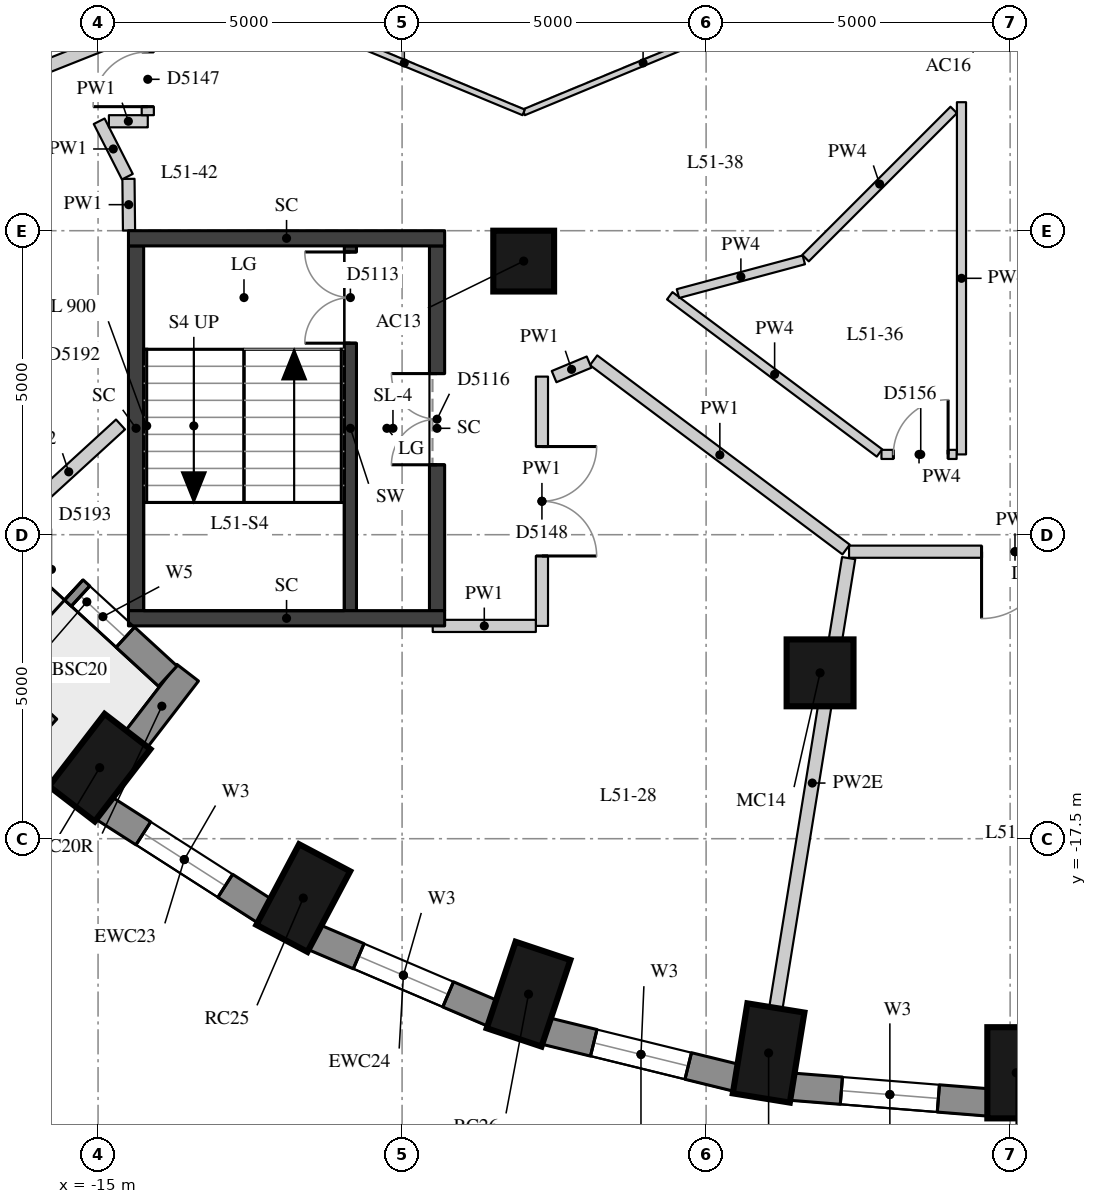
"""IFC4 building model, lengths in metres.
Left out: names, types, materials, properties, quantities, classifications, styles, units other than length and angle.
Written with IfcOpenShell. Run it as: python <this file> out.ifc"""

import sys

from ifc_helpers import new_model, si_unit, direction, frame, frame_2d, origin, origin_2d, place, context, subcontext, project, spatial, rectangle, extrude, element, fill, save


model = new_model("IFC4")
c1 = context("Model", 3, precision=1e-05, world=origin(), true_north=direction((0.0, 1.0)))
c2 = subcontext(c1, "Body", "Model", "MODEL_VIEW")
j1 = project(units=[si_unit("LENGTHUNIT", "METRE"), si_unit("PLANEANGLEUNIT", "RADIAN")], contexts=[c1])
p1 = place(None, origin())
s1 = spatial("IfcSite", under=j1, at=p1, CompositionType="ELEMENT")
p2 = place(p1, origin())
s2 = spatial("IfcBuilding", under=s1, at=p2, CompositionType="ELEMENT")
p3 = place(p2, frame((0.0, 0.0, 181.4)))
s3 = spatial("IfcBuildingStorey", under=s2, at=p3, CompositionType="ELEMENT", Elevation=181.4)
for number, where, z_axis, x_axis in (
    (1, (-14.973, -16.332, 0.0), (0.0, 0.0, 1.0), (-0.61, -0.792, 0.0)),
    (2, (-11.625, -18.476, 0.0), (0.0, 0.0, 1.0), (-0.468, -0.884, 0.0)),
    (3, (-7.92, -20.056, 0.0), (0.0, 0.0, 1.0), (-0.317, -0.949, 0.0)),
    (4, (-3.972, -21.024, 0.0), (0.0, 0.0, 1.0), (-0.16, -0.987, 0.0)),
    (5, (0.1, -21.35, 0.0), (0.0, 0.0, 1.0), (0.0, -1.0, 0.0)),
):
    element("IfcColumn", number, at=place(p3, frame(where, z_axis=z_axis, x_axis=x_axis)), inside=s3, PredefinedType="COLUMN", context=c2, shape_type="SweptSolid", body=[
        extrude(rectangle(XDim=1.5, YDim=0.95, at=origin_2d()), origin(), (0.0, 0.0, 1.0), 3.3),
    ])
p4 = place(p3, frame((-8.0, -8.0, 0.0), z_axis=(0.0, 0.0, 1.0), x_axis=(1.0, 0.0, 0.0)))
e6 = element("IfcColumn", 6, at=p4, inside=s3, PredefinedType="COLUMN", context=c2, shape_type="SweptSolid", body=[
    extrude(rectangle(XDim=1.0, YDim=1.0, at=origin_2d()), origin(), (0.0, 0.0, 1.0), 3.3),
])
p5 = place(p3, frame((-3.126, -14.772, 0.0), z_axis=(0.0, 0.0, 1.0), x_axis=(1.0, 0.0, 0.0)))
e7 = element("IfcColumn", 7, at=p5, inside=s3, PredefinedType="COLUMN", context=c2, shape_type="SweptSolid", body=[
    extrude(rectangle(XDim=1.1, YDim=1.1, at=origin_2d()), origin(), (0.0, 0.0, 1.0), 3.3),
])
p6 = place(p3, frame((-14.908, -16.993, 0.0), z_axis=(0.0, 0.0, 1.0), x_axis=(0.842065914439, -0.539374633943, 0.0)))
e8 = element("IfcWall", 8, at=p6, inside=s3, PredefinedType="SOLIDWALL", context=c2, shape_type="SweptSolid", body=[
    extrude(rectangle(XDim=3.151, YDim=0.45, at=frame_2d((1.576, 0.0))), origin(), (0.0, 0.0, 1.0), 2.85),
])
p7 = place(p6, frame((0.776, 0.0, 0.4)))
e9 = element("IfcOpeningElement", 9, at=p7, cuts=e8, PredefinedType="OPENING", context=c2, shape_type="SweptSolid", body=[
    extrude(rectangle(XDim=1.6, YDim=1.75, at=frame_2d((0.8, 0.875))), frame((0.0, 0.235, 0.0), z_axis=(0.0, -1.0, 0.0), x_axis=(1.0, 0.0, 0.0)), (0.0, 0.0, 1.0), 0.47),
])
p8 = place(p3, frame((-11.45, -19.119, 0.0), z_axis=(0.0, 0.0, 1.0), x_axis=(0.919798725687, -0.392390499663, 0.0)))
e10 = element("IfcWall", 10, at=p8, inside=s3, PredefinedType="SOLIDWALL", context=c2, shape_type="SweptSolid", body=[
    extrude(rectangle(XDim=3.2, YDim=0.45, at=frame_2d((1.6, 0.0))), origin(), (0.0, 0.0, 1.0), 2.85),
])
p9 = place(p8, frame((0.8, 0.0, 0.4)))
e11 = element("IfcOpeningElement", 11, at=p9, cuts=e10, PredefinedType="OPENING", context=c2, shape_type="SweptSolid", body=[
    extrude(rectangle(XDim=1.6, YDim=1.75, at=frame_2d((0.8, 0.875))), frame((0.0, 0.235, 0.0), z_axis=(0.0, -1.0, 0.0), x_axis=(1.0, 0.0, 0.0)), (0.0, 0.0, 1.0), 0.47),
])
p10 = place(p3, frame((-7.643, -20.662, 0.0), z_axis=(0.0, 0.0, 1.0), x_axis=(0.971232901476, -0.238131583563, 0.0)))
e12 = element("IfcWall", 12, at=p10, inside=s3, PredefinedType="SOLIDWALL", context=c2, shape_type="SweptSolid", body=[
    extrude(rectangle(XDim=3.237, YDim=0.45, at=frame_2d((1.618, 0.0))), origin(), (0.0, 0.0, 1.0), 2.85),
])
p11 = place(p10, frame((0.818, 0.0, 0.4)))
e13 = element("IfcOpeningElement", 13, at=p11, cuts=e12, PredefinedType="OPENING", context=c2, shape_type="SweptSolid", body=[
    extrude(rectangle(XDim=1.6, YDim=1.75, at=frame_2d((0.8, 0.875))), frame((0.0, 0.235, 0.0), z_axis=(0.0, -1.0, 0.0), x_axis=(1.0, 0.0, 0.0)), (0.0, 0.0, 1.0), 0.47),
])
p12 = place(p3, frame((-3.601, -21.578, 0.0), z_axis=(0.0, 0.0, 1.0), x_axis=(0.996812416891, -0.079780984773, 0.0)))
e14 = element("IfcWall", 14, at=p12, inside=s3, PredefinedType="SOLIDWALL", context=c2, shape_type="SweptSolid", body=[
    extrude(rectangle(XDim=3.256, YDim=0.45, at=frame_2d((1.628, 0.0))), origin(), (0.0, 0.0, 1.0), 2.85),
])
p13 = place(p12, frame((0.828, 0.0, 0.4)))
e15 = element("IfcOpeningElement", 15, at=p13, cuts=e14, PredefinedType="OPENING", context=c2, shape_type="SweptSolid", body=[
    extrude(rectangle(XDim=1.6, YDim=1.75, at=frame_2d((0.8, 0.875))), frame((0.0, 0.235, 0.0), z_axis=(0.0, -1.0, 0.0), x_axis=(1.0, 0.0, 0.0)), (0.0, 0.0, 1.0), 0.47),
])
p14 = place(p3, frame((-14.375, -15.871, 0.0), z_axis=(0.0, 0.0, 1.0), x_axis=(0.609982261713, 0.792415068253, 0.0)))
e16 = element("IfcWall", 16, at=p14, inside=s3, PredefinedType="SOLIDWALL", context=c2, shape_type="SweptSolid", body=[
    extrude(rectangle(XDim=1.39, YDim=0.45, at=frame_2d((0.695, 0.0))), origin(), (0.0, 0.0, 1.0), 2.4),
])
p15 = place(p3, frame((-16.515, -12.384, 0.0), z_axis=(0.0, 0.0, 1.0), x_axis=(0.736968915604, -0.675926636133, 0.0)))
e17 = element("IfcWall", 17, at=p15, inside=s3, PredefinedType="SOLIDWALL", context=c2, shape_type="SweptSolid", body=[
    extrude(rectangle(XDim=3.612, YDim=0.45, at=frame_2d((1.806, 0.0))), origin(), (0.0, 0.0, 1.0), 2.85),
])
p16 = place(p15, frame((1.665, 0.0, 0.4)))
e18 = element("IfcOpeningElement", 18, at=p16, cuts=e17, PredefinedType="OPENING", context=c2, shape_type="SweptSolid", body=[
    extrude(rectangle(XDim=1.0, YDim=1.75, at=frame_2d((0.5, 0.875))), frame((0.0, 0.235, 0.0), z_axis=(0.0, -1.0, 0.0), x_axis=(1.0, 0.0, 0.0)), (0.0, 0.0, 1.0), 0.47),
])
p17 = place(p15, frame((0.515, 0.0, 0.0)))
e19 = element("IfcOpeningElement", 19, at=p17, cuts=e17, PredefinedType="OPENING", context=c2, shape_type="SweptSolid", body=[
    extrude(rectangle(XDim=1.0, YDim=2.15, at=frame_2d((0.5, 1.075))), frame((0.0, 0.235, 0.0), z_axis=(0.0, -1.0, 0.0), x_axis=(1.0, 0.0, 0.0)), (0.0, 0.0, 1.0), 0.47),
])
p18 = place(p3, frame((-17.244, -14.576, 0.0), z_axis=(0.0, 0.0, 1.0), x_axis=(0.737874397391, -0.674938051731, 0.0)))
e20 = element("IfcWall", 20, at=p18, inside=s3, PredefinedType="USERDEFINED", context=c2, shape_type="SweptSolid", body=[
    extrude(rectangle(XDim=1.8, YDim=0.7, at=frame_2d((0.9, 0.0))), origin(), (0.0, 0.0, 1.0), 0.75),
])
p19 = place(p3, frame((-10.85, -13.75, 0.0), z_axis=(0.0, 0.0, 1.0), x_axis=(0.0, 1.0, 0.0)))
e21 = element("IfcWall", 21, at=p19, inside=s3, PredefinedType="SHEAR", context=c2, shape_type="SweptSolid", body=[
    extrude(rectangle(XDim=6.0, YDim=0.2, at=frame_2d((3.0, 0.0))), origin(), (0.0, 0.0, 1.0), 2.85),
])
p20 = place(p19, frame((4.4, 0.0, 0.0)))
e22 = element("IfcOpeningElement", 22, at=p20, cuts=e21, PredefinedType="OPENING", context=c2, shape_type="SweptSolid", body=[
    extrude(rectangle(XDim=1.5, YDim=2.1, at=frame_2d((0.75, 1.05))), frame((0.0, 0.11, 0.0), z_axis=(0.0, -1.0, 0.0), x_axis=(1.0, 0.0, 0.0)), (0.0, 0.0, 1.0), 0.22),
])
p21 = place(p3, frame((-14.375, -13.75, -0.28), z_axis=(0.0, 0.0, 1.0), x_axis=(0.0, 1.0, 0.0)))
e23 = element("IfcWall", 23, at=p21, inside=s3, PredefinedType="SHEAR", context=c2, shape_type="SweptSolid", body=[
    extrude(rectangle(XDim=6.0, YDim=0.25, at=frame_2d((3.0, 0.0))), origin(), (0.0, 0.0, 1.0), 3.13),
])
p22 = place(p3, frame((-9.425, -13.75, -0.28), z_axis=(0.0, 0.0, 1.0), x_axis=(0.0, 1.0, 0.0)))
e24 = element("IfcWall", 24, at=p22, inside=s3, PredefinedType="SHEAR", context=c2, shape_type="SweptSolid", body=[
    extrude(rectangle(XDim=6.0, YDim=0.25, at=frame_2d((3.0, 0.0))), origin(), (0.0, 0.0, 1.0), 3.13),
])
p23 = place(p22, frame((2.4, 0.0, 0.28)))
e25 = element("IfcOpeningElement", 25, at=p23, cuts=e24, PredefinedType="OPENING", context=c2, shape_type="SweptSolid", body=[
    extrude(rectangle(XDim=1.5, YDim=2.1, at=frame_2d((0.75, 1.05))), frame((0.0, 0.135, 0.0), z_axis=(0.0, -1.0, 0.0), x_axis=(1.0, 0.0, 0.0)), (0.0, 0.0, 1.0), 0.27),
])
for number, where, z_axis, x_axis in (
    (26, (-14.5, -7.625, -0.28), (0.0, 0.0, 1.0), (1.0, 0.0, 0.0)),
    (27, (-14.5, -13.875, -0.28), (0.0, 0.0, 1.0), (1.0, 0.0, 0.0)),
):
    element("IfcWall", number, at=place(p3, frame(where, z_axis=z_axis, x_axis=x_axis)), inside=s3, PredefinedType="SHEAR", context=c2, shape_type="SweptSolid", body=[
        extrude(rectangle(XDim=5.2, YDim=0.25, at=frame_2d((2.6, 0.0))), origin(), (0.0, 0.0, 1.0), 3.13),
    ])
p24 = place(p3, frame((-7.7, -9.9, 0.0), z_axis=(0.0, 0.0, 1.0), x_axis=(0.0, -1.0, 0.0)))
e28 = element("IfcWall", 28, at=p24, inside=s3, PredefinedType="PARTITIONING", context=c2, shape_type="SweptSolid", body=[
    extrude(rectangle(XDim=4.1, YDim=0.2, at=frame_2d((2.05, 0.0))), origin(), (0.0, 0.0, 1.0), 2.85),
])
p25 = place(p24, frame((1.15, 0.0, 0.0)))
e29 = element("IfcOpeningElement", 29, at=p25, cuts=e28, PredefinedType="OPENING", context=c2, shape_type="SweptSolid", body=[
    extrude(rectangle(XDim=1.8, YDim=2.1, at=frame_2d((0.9, 1.05))), frame((0.0, 0.11, 0.0), z_axis=(0.0, -1.0, 0.0), x_axis=(1.0, 0.0, 0.0)), (0.0, 0.0, 1.0), 0.22),
])
p26 = place(p3, frame((-7.8, -14.0, 0.0), z_axis=(0.0, 0.0, 1.0), x_axis=(-1.0, 0.0, 0.0)))
e30 = element("IfcWall", 30, at=p26, inside=s3, PredefinedType="PARTITIONING", context=c2, shape_type="SweptSolid", body=[
    extrude(rectangle(XDim=1.696, YDim=0.2, at=frame_2d((0.848, 0.0))), origin(), (0.0, 0.0, 1.0), 2.85),
])
p27 = place(p3, frame((-14.491, -7.496, 0.0), z_axis=(0.0, 0.0, 1.0), x_axis=(-0.010931452674, 0.999940249886, 0.0)))
e31 = element("IfcWall", 31, at=p27, inside=s3, PredefinedType="PARTITIONING", context=c2, shape_type="SweptSolid", body=[
    extrude(rectangle(XDim=0.849, YDim=0.2, at=frame_2d((0.424, 0.0))), origin(), (0.0, 0.0, 1.0), 2.85),
])
p28 = place(p3, frame((-14.518, -6.612, 0.0), z_axis=(0.0, 0.0, 1.0), x_axis=(-0.45321774915, 0.891399838375, 0.0)))
e32 = element("IfcWall", 32, at=p28, inside=s3, PredefinedType="PARTITIONING", context=c2, shape_type="SweptSolid", body=[
    extrude(rectangle(XDim=1.023, YDim=0.2, at=frame_2d((0.511, 0.0))), origin(), (0.0, 0.0, 1.0), 2.85),
])
p29 = place(p3, frame((-14.822, -5.7, 0.0), z_axis=(0.0, 0.0, 1.0), x_axis=(1.0, 0.0, 0.0)))
e33 = element("IfcWall", 33, at=p29, inside=s3, PredefinedType="PARTITIONING", context=c2, shape_type="SweptSolid", body=[
    extrude(rectangle(XDim=0.639, YDim=0.2, at=frame_2d((0.32, 0.0))), origin(), (0.0, 0.0, 1.0), 2.85),
])
p30 = place(p3, frame((-14.182, -5.6, 0.0), z_axis=(0.0, 0.0, 1.0), x_axis=(0.0, 1.0, 0.0)))
e34 = element("IfcWall", 34, at=p30, inside=s3, PredefinedType="PARTITIONING", context=c2, shape_type="SweptSolid", body=[
    extrude(rectangle(XDim=4.111, YDim=0.2, at=frame_2d((2.055, 0.0))), origin(), (0.0, 0.0, 1.0), 2.85),
])
p31 = place(p30, frame((0.14, 0.0, 0.0)))
e35 = element("IfcOpeningElement", 35, at=p31, cuts=e34, PredefinedType="OPENING", context=c2, shape_type="SweptSolid", body=[
    extrude(rectangle(XDim=0.9, YDim=2.1, at=frame_2d((0.45, 1.05))), frame((0.0, 0.11, 0.0), z_axis=(0.0, -1.0, 0.0), x_axis=(1.0, 0.0, 0.0)), (0.0, 0.0, 1.0), 0.22),
])
p32 = place(p3, frame((2.809, -12.78, 0.0), z_axis=(0.0, 0.0, 1.0), x_axis=(-1.0, 0.0, 0.0)))
e36 = element("IfcWall", 36, at=p32, inside=s3, PredefinedType="PARTITIONING", context=c2, shape_type="SweptSolid", body=[
    extrude(rectangle(XDim=5.458, YDim=0.2, at=frame_2d((2.729, 0.0))), origin(), (0.0, 0.0, 1.0), 2.85),
])
p33 = place(p32, frame((2.179, 0.0, 0.0)))
e37 = element("IfcOpeningElement", 37, at=p33, cuts=e36, PredefinedType="OPENING", context=c2, shape_type="SweptSolid", body=[
    extrude(rectangle(XDim=1.1, YDim=2.1, at=frame_2d((0.55, 1.05))), frame((0.0, 0.11, 0.0), z_axis=(0.0, -1.0, 0.0), x_axis=(1.0, 0.0, 0.0)), (0.0, 0.0, 1.0), 0.22),
])
p34 = place(p3, frame((-2.698, -12.744, 0.0), z_axis=(0.0, 0.0, 1.0), x_axis=(-0.800208812098, 0.59972148289, 0.0)))
e38 = element("IfcWall", 38, at=p34, inside=s3, PredefinedType="PARTITIONING", context=c2, shape_type="SweptSolid", body=[
    extrude(rectangle(XDim=5.19, YDim=0.2, at=frame_2d((2.595, 0.0))), origin(), (0.0, 0.0, 1.0), 2.85),
])
p35 = place(p3, frame((-6.925, -9.661, 0.0), z_axis=(0.0, 0.0, 1.0), x_axis=(-0.923725195793, -0.383055821855, 0.0)))
e39 = element("IfcWall", 39, at=p35, inside=s3, PredefinedType="PARTITIONING", context=c2, shape_type="SweptSolid", body=[
    extrude(rectangle(XDim=0.623, YDim=0.2, at=frame_2d((0.312, 0.0))), origin(), (0.0, 0.0, 1.0), 2.85),
])
p36 = place(p3, frame((-0.8, -5.386, 0.0), z_axis=(0.0, 0.0, 1.0), x_axis=(0.0, -1.0, 0.0)))
e40 = element("IfcWall", 40, at=p36, inside=s3, PredefinedType="PARTITIONING", context=c2, shape_type="SweptSolid", body=[
    extrude(rectangle(XDim=5.793, YDim=0.15, at=frame_2d((2.896, 0.0))), origin(), (0.0, 0.0, 1.0), 2.85),
])
p37 = place(p3, frame((-0.88, -11.179, 0.0), z_axis=(0.0, 0.0, 1.0), x_axis=(-1.0, 0.0, 0.0)))
e41 = element("IfcWall", 41, at=p37, inside=s3, PredefinedType="PARTITIONING", context=c2, shape_type="SweptSolid", body=[
    extrude(rectangle(XDim=1.236, YDim=0.15, at=frame_2d((0.618, 0.0))), origin(), (0.0, 0.0, 1.0), 2.85),
])
p38 = place(p37, frame((0.14, 0.0, 0.0)))
e42 = element("IfcOpeningElement", 42, at=p38, cuts=e41, PredefinedType="OPENING", context=c2, shape_type="SweptSolid", body=[
    extrude(rectangle(XDim=0.9, YDim=2.1, at=frame_2d((0.45, 1.05))), frame((0.0, 0.085, 0.0), z_axis=(0.0, -1.0, 0.0), x_axis=(1.0, 0.0, 0.0)), (0.0, 0.0, 1.0), 0.17),
])
p39 = place(p3, frame((-2.148, -11.156, 0.0), z_axis=(0.0, 0.0, 1.0), x_axis=(-0.800210636755, 0.599719048241, 0.0)))
e43 = element("IfcWall", 43, at=p39, inside=s3, PredefinedType="PARTITIONING", context=c2, shape_type="SweptSolid", body=[
    extrude(rectangle(XDim=4.311, YDim=0.15, at=frame_2d((2.155, 0.0))), origin(), (0.0, 0.0, 1.0), 2.85),
])
p40 = place(p3, frame((-5.463, -8.534, 0.0), z_axis=(0.0, 0.0, 1.0), x_axis=(0.965888027346, 0.258960071498, 0.0)))
e44 = element("IfcWall", 44, at=p40, inside=s3, PredefinedType="PARTITIONING", context=c2, shape_type="SweptSolid", body=[
    extrude(rectangle(XDim=2.143, YDim=0.15, at=frame_2d((1.071, 0.0))), origin(), (0.0, 0.0, 1.0), 2.85),
])
p41 = place(p3, frame((-3.365, -7.951, 0.0), z_axis=(0.0, 0.0, 1.0), x_axis=(0.707106781187, 0.707106781187, 0.0)))
e45 = element("IfcWall", 45, at=p41, inside=s3, PredefinedType="PARTITIONING", context=c2, shape_type="SweptSolid", body=[
    extrude(rectangle(XDim=3.447, YDim=0.15, at=frame_2d((1.723, 0.0))), origin(), (0.0, 0.0, 1.0), 2.85),
])
p42 = place(p3, frame((-19.99, -6.441, 0.0), z_axis=(0.0, 0.0, 1.0), x_axis=(0.929499857769, 0.368822470042, 0.0)))
e46 = element("IfcWall", 46, at=p42, inside=s3, PredefinedType="PARTITIONING", context=c2, shape_type="SweptSolid", body=[
    extrude(rectangle(XDim=6.101, YDim=0.22, at=frame_2d((3.05, 0.0))), origin(), (0.0, 0.0, 1.0), 2.85),
])
p43 = place(p3, frame((-16.334, -12.245, 0.0), z_axis=(0.0, 0.0, 1.0), x_axis=(0.737917457379, 0.674890973487, 0.0)))
e47 = element("IfcWall", 47, at=p43, inside=s3, PredefinedType="PARTITIONING", context=c2, shape_type="SweptSolid", body=[
    extrude(rectangle(XDim=2.309, YDim=0.22, at=frame_2d((1.154, 0.0))), origin(), (0.0, 0.0, 1.0), 2.85),
])
p44 = place(p3, frame((-3.852, -20.284, 0.0), z_axis=(0.0, 0.0, 1.0), x_axis=(0.159690244465, 0.987167172176, 0.0)))
e48 = element("IfcWall", 48, at=p44, inside=s3, PredefinedType="PARTITIONING", context=c2, shape_type="SweptSolid", body=[
    extrude(rectangle(XDim=7.494, YDim=0.22, at=frame_2d((3.747, 0.0))), origin(), (0.0, 0.0, 1.0), 2.4),
])
for number, where, z_axis, x_axis in (
    (49, (-4.073, -3.927, 0.0), (0.0, 0.0, 1.0), (-0.924, -0.383, 0.0)),
    (50, (-8.0, -5.554, 0.0), (0.0, 0.0, 1.0), (-0.924, 0.383, 0.0)),
):
    element("IfcWall", number, at=place(p3, frame(where, z_axis=z_axis, x_axis=x_axis)), inside=s3, PredefinedType="PARTITIONING", context=c2, shape_type="SweptSolid", body=[
        extrude(rectangle(XDim=4.251, YDim=0.1, at=frame_2d((2.125, 0.0))), origin(), (0.0, 0.0, 1.0), 2.85),
    ])
p45 = place(p7, origin())
e51 = element("IfcWindow", 51, at=p45, inside=s3, PartitioningType="SINGLE_PANEL", PredefinedType="WINDOW", context=c2, shape_type="SweptSolid", body=[
    extrude(rectangle(XDim=1.6, YDim=1.75, at=frame_2d((0.8, 0.875))), frame((0.0, 0.035, 0.0), z_axis=(0.0, -1.0, 0.0), x_axis=(1.0, 0.0, 0.0)), (0.0, 0.0, 1.0), 0.06),
])
fill(e9, e51)
p46 = place(p9, origin())
e52 = element("IfcWindow", 52, at=p46, inside=s3, PartitioningType="SINGLE_PANEL", PredefinedType="WINDOW", context=c2, shape_type="SweptSolid", body=[
    extrude(rectangle(XDim=1.6, YDim=1.75, at=frame_2d((0.8, 0.875))), frame((0.0, 0.035, 0.0), z_axis=(0.0, -1.0, 0.0), x_axis=(1.0, 0.0, 0.0)), (0.0, 0.0, 1.0), 0.06),
])
fill(e11, e52)
p47 = place(p11, origin())
e53 = element("IfcWindow", 53, at=p47, inside=s3, PartitioningType="SINGLE_PANEL", PredefinedType="WINDOW", context=c2, shape_type="SweptSolid", body=[
    extrude(rectangle(XDim=1.6, YDim=1.75, at=frame_2d((0.8, 0.875))), frame((0.0, 0.035, 0.0), z_axis=(0.0, -1.0, 0.0), x_axis=(1.0, 0.0, 0.0)), (0.0, 0.0, 1.0), 0.06),
])
fill(e13, e53)
p48 = place(p13, origin())
e54 = element("IfcWindow", 54, at=p48, inside=s3, PartitioningType="SINGLE_PANEL", PredefinedType="WINDOW", context=c2, shape_type="SweptSolid", body=[
    extrude(rectangle(XDim=1.6, YDim=1.75, at=frame_2d((0.8, 0.875))), frame((0.0, 0.035, 0.0), z_axis=(0.0, -1.0, 0.0), x_axis=(1.0, 0.0, 0.0)), (0.0, 0.0, 1.0), 0.06),
])
fill(e15, e54)
p49 = place(p16, origin())
e55 = element("IfcWindow", 55, at=p49, inside=s3, PartitioningType="SINGLE_PANEL", PredefinedType="WINDOW", context=c2, shape_type="SweptSolid", body=[
    extrude(rectangle(XDim=1.0, YDim=1.75, at=frame_2d((0.5, 0.875))), frame((0.0, 0.035, 0.0), z_axis=(0.0, -1.0, 0.0), x_axis=(1.0, 0.0, 0.0)), (0.0, 0.0, 1.0), 0.06),
])
fill(e18, e55)
p50 = place(p17, origin())
e56 = element("IfcDoor", 56, at=p50, inside=s3, OperationType="SINGLE_SWING_LEFT", PredefinedType="DOOR", context=c2, shape_type="SweptSolid", body=[
    extrude(rectangle(XDim=1.0, YDim=2.15, at=frame_2d((0.5, 1.075))), frame((0.0, -0.025, 0.0), z_axis=(0.0, -1.0, 0.0), x_axis=(1.0, 0.0, 0.0)), (0.0, 0.0, 1.0), 0.05),
])
fill(e19, e56)
p51 = place(p20, origin())
e57 = element("IfcDoor", 57, at=p51, inside=s3, OperationType="DOUBLE_DOOR_SINGLE_SWING", PredefinedType="DOOR", context=c2, shape_type="SweptSolid", body=[
    extrude(rectangle(XDim=1.5, YDim=2.1, at=frame_2d((0.75, 1.05))), frame((0.0, 0.025, 0.0), z_axis=(0.0, -1.0, 0.0), x_axis=(1.0, 0.0, 0.0)), (0.0, 0.0, 1.0), 0.05),
])
fill(e22, e57)
p52 = place(p23, origin())
e58 = element("IfcDoor", 58, at=p52, inside=s3, OperationType="DOUBLE_DOOR_SINGLE_SWING", PredefinedType="DOOR", context=c2, shape_type="SweptSolid", body=[
    extrude(rectangle(XDim=1.5, YDim=2.1, at=frame_2d((0.75, 1.05))), frame((0.0, 0.025, 0.0), z_axis=(0.0, -1.0, 0.0), x_axis=(1.0, 0.0, 0.0)), (0.0, 0.0, 1.0), 0.05),
])
fill(e25, e58)
p53 = place(p31, origin())
e59 = element("IfcDoor", 59, at=p53, inside=s3, OperationType="SINGLE_SWING_LEFT", PredefinedType="DOOR", context=c2, shape_type="SweptSolid", body=[
    extrude(rectangle(XDim=0.9, YDim=2.1, at=frame_2d((0.45, 1.05))), frame((0.0, 0.025, 0.0), z_axis=(0.0, -1.0, 0.0), x_axis=(1.0, 0.0, 0.0)), (0.0, 0.0, 1.0), 0.05),
])
fill(e35, e59)
p54 = place(p25, origin())
e60 = element("IfcDoor", 60, at=p54, inside=s3, OperationType="DOUBLE_DOOR_SINGLE_SWING", PredefinedType="DOOR", context=c2, shape_type="SweptSolid", body=[
    extrude(rectangle(XDim=1.8, YDim=2.1, at=frame_2d((0.9, 1.05))), frame((0.0, 0.025, 0.0), z_axis=(0.0, -1.0, 0.0), x_axis=(1.0, 0.0, 0.0)), (0.0, 0.0, 1.0), 0.05),
])
fill(e29, e60)
p55 = place(p33, origin())
e61 = element("IfcDoor", 61, at=p55, inside=s3, OperationType="SINGLE_SWING_RIGHT", PredefinedType="DOOR", context=c2, shape_type="SweptSolid", body=[
    extrude(rectangle(XDim=1.1, YDim=2.1, at=frame_2d((0.55, 1.05))), frame((0.0, 0.025, 0.0), z_axis=(0.0, -1.0, 0.0), x_axis=(1.0, 0.0, 0.0)), (0.0, 0.0, 1.0), 0.05),
])
fill(e37, e61)
p56 = place(p38, origin())
e62 = element("IfcDoor", 62, at=p56, inside=s3, OperationType="SINGLE_SWING_RIGHT", PredefinedType="DOOR", context=c2, shape_type="SweptSolid", body=[
    extrude(rectangle(XDim=0.9, YDim=2.1, at=frame_2d((0.45, 1.05))), frame((0.0, 0.025, 0.0), z_axis=(0.0, -1.0, 0.0), x_axis=(1.0, 0.0, 0.0)), (0.0, 0.0, 1.0), 0.05),
])
fill(e42, e62)
save(model, sys.argv[1])
